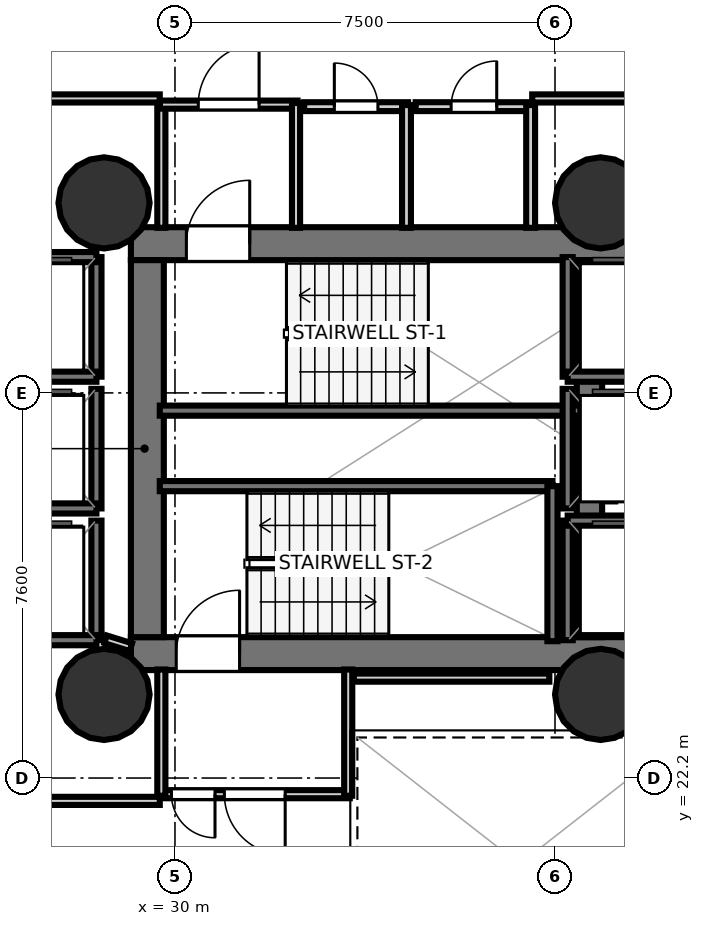
"""IFC4 building model, lengths in metres.
Left out: names, types, materials, properties, quantities, classifications, styles, units other than length and angle.
Written with IfcOpenShell. Run it as: python <this file> out.ifc"""

import sys

from ifc_helpers import new_model, si_unit, direction, frame, frame_2d, origin, origin_2d, place, context, subcontext, project, spatial, rectangle, hollow_circle, extrude, element, fill, save


model = new_model("IFC4")
c1 = context("Model", 3, precision=1e-05, world=origin(), true_north=direction((0.0, 1.0)))
c2 = subcontext(c1, "Body", "Model", "MODEL_VIEW")
j1 = project(units=[si_unit("LENGTHUNIT", "METRE"), si_unit("PLANEANGLEUNIT", "RADIAN")], contexts=[c1])
p1 = place(None, origin())
s1 = spatial("IfcSite", under=j1, at=p1, CompositionType="ELEMENT")
p2 = place(p1, origin())
s2 = spatial("IfcBuilding", under=s1, at=p2, CompositionType="ELEMENT")
p3 = place(p2, frame((0.0, 0.0, 29.4)))
s3 = spatial("IfcBuildingStorey", under=s2, at=p3, CompositionType="ELEMENT", Elevation=29.4)
p4 = place(p3, frame((29.13, 32.745, 0.0), z_axis=(0.0, 0.0, 1.0), x_axis=(1.0, 0.0, 0.0)))
e1 = element("IfcWall", 1, at=p4, inside=s3, PredefinedType="SHEAR", context=c2, shape_type="SweptSolid", body=[
    extrude(rectangle(XDim=10.72, YDim=0.65, at=frame_2d((5.36, 0.0))), origin(), (0.0, 0.0, 1.0), 3.52),
])
p5 = place(p4, frame((1.095, 0.0, 0.0)))
e2 = element("IfcOpeningElement", 2, at=p5, cuts=e1, PredefinedType="OPENING", context=c2, shape_type="SweptSolid", body=[
    extrude(rectangle(XDim=1.25, YDim=2.15, at=frame_2d((0.625, 1.075))), frame((0.0, 0.335, 0.0), z_axis=(0.0, -1.0, 0.0), x_axis=(1.0, 0.0, 0.0)), (0.0, 0.0, 1.0), 0.67),
])
p6 = place(p3, frame((29.13, 24.655, 0.0), z_axis=(0.0, 0.0, 1.0), x_axis=(1.0, 0.0, 0.0)))
e3 = element("IfcWall", 3, at=p6, inside=s3, PredefinedType="SHEAR", context=c2, shape_type="SweptSolid", body=[
    extrude(rectangle(XDim=10.72, YDim=0.65, at=frame_2d((5.36, 0.0))), origin(), (0.0, 0.0, 1.0), 3.52),
])
p7 = place(p6, frame((0.895, 0.0, 0.0)))
e4 = element("IfcOpeningElement", 4, at=p7, cuts=e3, PredefinedType="OPENING", context=c2, shape_type="SweptSolid", body=[
    extrude(rectangle(XDim=1.25, YDim=2.15, at=frame_2d((0.625, 1.075))), frame((0.0, 0.335, 0.0), z_axis=(0.0, -1.0, 0.0), x_axis=(1.0, 0.0, 0.0)), (0.0, 0.0, 1.0), 0.67),
])
p8 = place(p3, frame((29.455, 24.98, 0.0), z_axis=(0.0, 0.0, 1.0), x_axis=(0.0, 1.0, 0.0)))
e5 = element("IfcWall", 5, at=p8, inside=s3, PredefinedType="SHEAR", context=c2, shape_type="SweptSolid", body=[
    extrude(rectangle(XDim=7.44, YDim=0.65, at=frame_2d((3.72, 0.0))), origin(), (0.0, 0.0, 1.0), 3.52),
])
p9 = place(p3, frame((38.18, 24.98, 0.0), z_axis=(0.0, 0.0, 1.0), x_axis=(0.0, 1.0, 0.0)))
e6 = element("IfcWall", 6, at=p9, inside=s3, PredefinedType="SHEAR", context=c2, shape_type="SweptSolid", body=[
    extrude(rectangle(XDim=7.44, YDim=0.5, at=frame_2d((3.72, 0.0))), origin(), (0.0, 0.0, 1.0), 3.52),
])
for number, where, z_axis, x_axis in (
    (7, (28.6, 33.55, 0.0), (0.0, 0.0, 1.0), (1.0, 0.0, 0.0)),
    (8, (28.6, 23.85, 0.0), (0.0, 0.0, 1.0), (1.0, 0.0, 0.0)),
    (9, (38.4, 33.55, 0.0), (0.0, 0.0, 1.0), (1.0, 0.0, 0.0)),
    (10, (38.4, 23.85, 0.0), (0.0, 0.0, 1.0), (1.0, 0.0, 0.0)),
):
    element("IfcColumn", number, at=place(p3, frame(where, z_axis=z_axis, x_axis=x_axis)), inside=s3, PredefinedType="COLUMN", context=c2, shape_type="SweptSolid", body=[
        extrude(hollow_circle(Radius=0.9, WallThickness=0.045, at=origin_2d()), origin(), (0.0, 0.0, 1.0), 3.7),
    ])
p10 = place(p3, frame((29.7, 29.45, 0.0), z_axis=(0.0, 0.0, 1.0), x_axis=(1.0, 0.0, 0.0)))
e11 = element("IfcWall", 11, at=p10, inside=s3, PredefinedType="SOLIDWALL", context=c2, shape_type="SweptSolid", body=[
    extrude(rectangle(XDim=8.3, YDim=0.2, at=frame_2d((4.15, 0.0))), origin(), (0.0, 0.0, 1.0), 3.52),
])
p11 = place(p3, frame((29.7, 27.96, 0.0), z_axis=(0.0, 0.0, 1.0), x_axis=(1.0, 0.0, 0.0)))
e12 = element("IfcWall", 12, at=p11, inside=s3, PredefinedType="SOLIDWALL", context=c2, shape_type="SweptSolid", body=[
    extrude(rectangle(XDim=7.75, YDim=0.2, at=frame_2d((3.875, 0.0))), origin(), (0.0, 0.0, 1.0), 3.52),
])
p12 = place(p3, frame((37.45, 24.9, 0.0), z_axis=(0.0, 0.0, 1.0), x_axis=(0.0, 1.0, 0.0)))
e13 = element("IfcWall", 13, at=p12, inside=s3, PredefinedType="SOLIDWALL", context=c2, shape_type="SweptSolid", body=[
    extrude(rectangle(XDim=3.06, YDim=0.2, at=frame_2d((1.53, 0.0))), origin(), (0.0, 0.0, 1.0), 3.52),
])
p13 = place(p3, frame((37.75, 30.12, 0.0), z_axis=(0.0, 0.0, 1.0), x_axis=(0.0, 1.0, 0.0)))
e14 = element("IfcWall", 14, at=p13, inside=s3, PredefinedType="SOLIDWALL", context=c2, shape_type="SweptSolid", body=[
    extrude(rectangle(XDim=2.36, YDim=0.2, at=frame_2d((1.18, 0.0))), origin(), (0.0, 0.0, 1.0), 3.52),
])
p14 = place(p3, frame((37.75, 30.12, 0.0), z_axis=(0.0, 0.0, 1.0), x_axis=(1.0, 0.0, 0.0)))
e15 = element("IfcWall", 15, at=p14, inside=s3, PredefinedType="SOLIDWALL", context=c2, shape_type="SweptSolid", body=[
    extrude(rectangle(XDim=2.1, YDim=0.2, at=frame_2d((1.05, 0.0))), origin(), (0.0, 0.0, 1.0), 3.52),
])
p15 = place(p3, frame((37.75, 24.92, 0.0), z_axis=(0.0, 0.0, 1.0), x_axis=(0.0, 1.0, 0.0)))
e16 = element("IfcWall", 16, at=p15, inside=s3, PredefinedType="SOLIDWALL", context=c2, shape_type="SweptSolid", body=[
    extrude(rectangle(XDim=2.36, YDim=0.2, at=frame_2d((1.18, 0.0))), origin(), (0.0, 0.0, 1.0), 3.52),
])
p16 = place(p3, frame((37.75, 27.28, 0.0), z_axis=(0.0, 0.0, 1.0), x_axis=(1.0, 0.0, 0.0)))
e17 = element("IfcWall", 17, at=p16, inside=s3, PredefinedType="SOLIDWALL", context=c2, shape_type="SweptSolid", body=[
    extrude(rectangle(XDim=2.1, YDim=0.2, at=frame_2d((1.05, 0.0))), origin(), (0.0, 0.0, 1.0), 3.52),
])
p17 = place(p3, frame((28.45, 30.12, 0.0), z_axis=(0.0, 0.0, 1.0), x_axis=(0.0, 1.0, 0.0)))
e18 = element("IfcWall", 18, at=p17, inside=s3, PredefinedType="SOLIDWALL", context=c2, shape_type="SweptSolid", body=[
    extrude(rectangle(XDim=2.36, YDim=0.2, at=frame_2d((1.18, 0.0))), origin(), (0.0, 0.0, 1.0), 3.52),
])
for number, where, z_axis, x_axis in (
    (19, (26.35, 32.48, 0.0), (0.0, 0.0, 1.0), (1.0, 0.0, 0.0)),
    (20, (26.35, 30.12, 0.0), (0.0, 0.0, 1.0), (1.0, 0.0, 0.0)),
):
    element("IfcWall", number, at=place(p3, frame(where, z_axis=z_axis, x_axis=x_axis)), inside=s3, PredefinedType="SOLIDWALL", context=c2, shape_type="SweptSolid", body=[
        extrude(rectangle(XDim=2.1, YDim=0.2, at=frame_2d((1.05, 0.0))), origin(), (0.0, 0.0, 1.0), 3.52),
    ])
p18 = place(p3, frame((28.45, 27.52, 0.0), z_axis=(0.0, 0.0, 1.0), x_axis=(0.0, 1.0, 0.0)))
e21 = element("IfcWall", 21, at=p18, inside=s3, PredefinedType="SOLIDWALL", context=c2, shape_type="SweptSolid", body=[
    extrude(rectangle(XDim=2.36, YDim=0.2, at=frame_2d((1.18, 0.0))), origin(), (0.0, 0.0, 1.0), 3.52),
])
p19 = place(p3, frame((26.35, 27.52, 0.0), z_axis=(0.0, 0.0, 1.0), x_axis=(1.0, 0.0, 0.0)))
e22 = element("IfcWall", 22, at=p19, inside=s3, PredefinedType="SOLIDWALL", context=c2, shape_type="SweptSolid", body=[
    extrude(rectangle(XDim=2.1, YDim=0.2, at=frame_2d((1.05, 0.0))), origin(), (0.0, 0.0, 1.0), 3.52),
])
p20 = place(p3, frame((28.45, 24.92, 0.0), z_axis=(0.0, 0.0, 1.0), x_axis=(0.0, 1.0, 0.0)))
e23 = element("IfcWall", 23, at=p20, inside=s3, PredefinedType="SOLIDWALL", context=c2, shape_type="SweptSolid", body=[
    extrude(rectangle(XDim=2.36, YDim=0.2, at=frame_2d((1.18, 0.0))), origin(), (0.0, 0.0, 1.0), 3.52),
])
p21 = place(p3, frame((26.35, 24.92, 0.0), z_axis=(0.0, 0.0, 1.0), x_axis=(1.0, 0.0, 0.0)))
e24 = element("IfcWall", 24, at=p21, inside=s3, PredefinedType="SOLIDWALL", context=c2, shape_type="SweptSolid", body=[
    extrude(rectangle(XDim=2.1, YDim=0.2, at=frame_2d((1.05, 0.0))), origin(), (0.0, 0.0, 1.0), 3.52),
])
p22 = place(p3, frame((37.75, 27.52, 0.0), z_axis=(0.0, 0.0, 1.0), x_axis=(0.0, 1.0, 0.0)))
e25 = element("IfcWall", 25, at=p22, inside=s3, PredefinedType="SOLIDWALL", context=c2, shape_type="SweptSolid", body=[
    extrude(rectangle(XDim=2.36, YDim=0.2, at=frame_2d((1.18, 0.0))), origin(), (0.0, 0.0, 1.0), 3.52),
])
p23 = place(p3, frame((29.731, 33.058, 0.0), z_axis=(0.0, 0.0, 1.0), x_axis=(0.0, 1.0, 0.0)))
e26 = element("IfcWall", 26, at=p23, inside=s3, PredefinedType="PARTITIONING", context=c2, shape_type="SweptSolid", body=[
    extrude(rectangle(XDim=2.462, YDim=0.16, at=frame_2d((1.231, 0.0))), origin(), (0.0, 0.0, 1.0), 2.84),
])
p24 = place(p3, frame((29.7, 35.489, 0.0), z_axis=(0.0, 0.0, 1.0), x_axis=(1.0, 0.0, 0.0)))
e27 = element("IfcWall", 27, at=p24, inside=s3, PredefinedType="PARTITIONING", context=c2, shape_type="SweptSolid", body=[
    extrude(rectangle(XDim=2.72, YDim=0.16, at=frame_2d((1.36, 0.0))), origin(), (0.0, 0.0, 1.0), 2.84),
])
p25 = place(p24, frame((0.76, 0.0, 0.0)))
e28 = element("IfcOpeningElement", 28, at=p25, cuts=e27, PredefinedType="OPENING", context=c2, shape_type="SweptSolid", body=[
    extrude(rectangle(XDim=1.2, YDim=2.15, at=frame_2d((0.6, 1.075))), frame((0.0, 0.09, 0.0), z_axis=(0.0, -1.0, 0.0), x_axis=(1.0, 0.0, 0.0)), (0.0, 0.0, 1.0), 0.18),
])
p26 = place(p3, frame((32.389, 35.52, 0.0), z_axis=(0.0, 0.0, 1.0), x_axis=(0.0, -1.0, 0.0)))
e29 = element("IfcWall", 29, at=p26, inside=s3, PredefinedType="PARTITIONING", context=c2, shape_type="SweptSolid", body=[
    extrude(rectangle(XDim=2.462, YDim=0.16, at=frame_2d((1.231, 0.0))), origin(), (0.0, 0.0, 1.0), 2.84),
])
p27 = place(p3, frame((33.45, 21.881, 0.0), z_axis=(0.0, 0.0, 1.0), x_axis=(-1.0, 0.0, 0.0)))
e30 = element("IfcWall", 30, at=p27, inside=s3, PredefinedType="PARTITIONING", context=c2, shape_type="SweptSolid", body=[
    extrude(rectangle(XDim=3.75, YDim=0.16, at=frame_2d((1.875, 0.0))), origin(), (0.0, 0.0, 1.0), 2.84),
])
p28 = place(p27, frame((1.275, 0.0, 0.0)))
e31 = element("IfcOpeningElement", 31, at=p28, cuts=e30, PredefinedType="OPENING", context=c2, shape_type="SweptSolid", body=[
    extrude(rectangle(XDim=1.2, YDim=2.15, at=frame_2d((0.6, 1.075))), frame((0.0, 0.09, 0.0), z_axis=(0.0, -1.0, 0.0), x_axis=(1.0, 0.0, 0.0)), (0.0, 0.0, 1.0), 0.18),
])
p29 = place(p27, frame((2.66, 0.0, 0.0)))
e32 = element("IfcOpeningElement", 32, at=p29, cuts=e30, PredefinedType="OPENING", context=c2, shape_type="SweptSolid", body=[
    extrude(rectangle(XDim=0.86, YDim=2.05, at=frame_2d((0.43, 1.025))), frame((0.0, 0.09, 0.0), z_axis=(0.0, -1.0, 0.0), x_axis=(1.0, 0.0, 0.0)), (0.0, 0.0, 1.0), 0.18),
])
for number, where, z_axis, x_axis in (
    (33, (29.731, 21.85, 0.0), (0.0, 0.0, 1.0), (0.0, 1.0, 0.0)),
    (34, (33.419, 24.342, 0.0), (0.0, 0.0, 1.0), (0.0, -1.0, 0.0)),
):
    element("IfcWall", number, at=place(p3, frame(where, z_axis=z_axis, x_axis=x_axis)), inside=s3, PredefinedType="PARTITIONING", context=c2, shape_type="SweptSolid", body=[
        extrude(rectangle(XDim=2.492, YDim=0.16, at=frame_2d((1.246, 0.0))), origin(), (0.0, 0.0, 1.0), 2.84),
    ])
p30 = place(p3, frame((32.55, 35.449, 0.0), z_axis=(0.0, 0.0, 1.0), x_axis=(1.0, 0.0, 0.0)))
e35 = element("IfcWall", 35, at=p30, inside=s3, PredefinedType="PLUMBINGWALL", context=c2, shape_type="SweptSolid", body=[
    extrude(rectangle(XDim=2.05, YDim=0.175, at=frame_2d((1.025, 0.0))), origin(), (0.0, 0.0, 1.0), 2.84),
])
p31 = place(p30, frame((0.595, 0.0, 0.0)))
e36 = element("IfcOpeningElement", 36, at=p31, cuts=e35, PredefinedType="OPENING", context=c2, shape_type="SweptSolid", body=[
    extrude(rectangle(XDim=0.86, YDim=2.05, at=frame_2d((0.43, 1.025))), frame((0.0, 0.097, 0.0), z_axis=(0.0, -1.0, 0.0), x_axis=(1.0, 0.0, 0.0)), (0.0, 0.0, 1.0), 0.195),
])
p32 = place(p3, frame((34.569, 35.48, 0.0), z_axis=(0.0, 0.0, 1.0), x_axis=(0.0, -1.0, 0.0)))
e37 = element("IfcWall", 37, at=p32, inside=s3, PredefinedType="PLUMBINGWALL", context=c2, shape_type="SweptSolid", body=[
    extrude(rectangle(XDim=2.422, YDim=0.175, at=frame_2d((1.211, 0.0))), origin(), (0.0, 0.0, 1.0), 2.84),
])
p33 = place(p3, frame((34.75, 35.449, 0.0), z_axis=(0.0, 0.0, 1.0), x_axis=(1.0, 0.0, 0.0)))
e38 = element("IfcWall", 38, at=p33, inside=s3, PredefinedType="PLUMBINGWALL", context=c2, shape_type="SweptSolid", body=[
    extrude(rectangle(XDim=2.3, YDim=0.175, at=frame_2d((1.15, 0.0))), origin(), (0.0, 0.0, 1.0), 2.84),
])
p34 = place(p33, frame((0.7, 0.0, 0.0)))
e39 = element("IfcOpeningElement", 39, at=p34, cuts=e38, PredefinedType="OPENING", context=c2, shape_type="SweptSolid", body=[
    extrude(rectangle(XDim=0.9, YDim=2.1, at=frame_2d((0.45, 1.05))), frame((0.0, 0.097, 0.0), z_axis=(0.0, -1.0, 0.0), x_axis=(1.0, 0.0, 0.0)), (0.0, 0.0, 1.0), 0.195),
])
p35 = place(p3, frame((37.019, 35.48, 0.0), z_axis=(0.0, 0.0, 1.0), x_axis=(0.0, -1.0, 0.0)))
e40 = element("IfcWall", 40, at=p35, inside=s3, PredefinedType="PLUMBINGWALL", context=c2, shape_type="SweptSolid", body=[
    extrude(rectangle(XDim=2.422, YDim=0.175, at=frame_2d((1.211, 0.0))), origin(), (0.0, 0.0, 1.0), 2.84),
])
p36 = place(p3, frame((29.13, 24.782, 0.0), z_axis=(0.0, 0.0, 1.0), x_axis=(-0.955000482512, 0.296604245422, 0.0)))
e41 = element("IfcWall", 41, at=p36, inside=s3, PredefinedType="PARTITIONING", context=c2, shape_type="SweptSolid", body=[
    extrude(rectangle(XDim=0.524, YDim=0.16, at=frame_2d((0.262, 0.0))), origin(), (0.0, 0.0, 1.0), 2.84),
])
p37 = place(p3, frame((37.389, 24.181, 0.0), z_axis=(0.0, 0.0, 1.0), x_axis=(-1.0, 0.0, 0.0)))
e42 = element("IfcWall", 42, at=p37, inside=s3, PredefinedType="PARTITIONING", context=c2, shape_type="SweptSolid", body=[
    extrude(rectangle(XDim=3.859, YDim=0.16, at=frame_2d((1.929, 0.0))), origin(), (0.0, 0.0, 1.0), 2.84),
])
p38 = place(p3, frame((39.818, 35.611, 0.0), z_axis=(0.0, 0.0, 1.0), x_axis=(-1.0, 0.0, 0.0)))
e43 = element("IfcWall", 43, at=p38, inside=s3, PredefinedType="PARTITIONING", context=c2, shape_type="SweptSolid", body=[
    extrude(rectangle(XDim=2.768, YDim=0.16, at=frame_2d((1.384, 0.0))), origin(), (0.0, 0.0, 1.0), 2.84),
])
p39 = place(p3, frame((29.7, 35.611, 0.0), z_axis=(0.0, 0.0, 1.0), x_axis=(-1.0, 0.0, 0.0)))
e44 = element("IfcWall", 44, at=p39, inside=s3, PredefinedType="PARTITIONING", context=c2, shape_type="SweptSolid", body=[
    extrude(rectangle(XDim=3.28, YDim=0.16, at=frame_2d((1.64, 0.0))), origin(), (0.0, 0.0, 1.0), 2.798),
])
p40 = place(p3, frame((26.42, 21.749, 0.0), z_axis=(0.0, 0.0, 1.0), x_axis=(1.0, 0.0, 0.0)))
e45 = element("IfcWall", 45, at=p40, inside=s3, PredefinedType="PARTITIONING", context=c2, shape_type="SweptSolid", body=[
    extrude(rectangle(XDim=3.28, YDim=0.16, at=frame_2d((1.64, 0.0))), origin(), (0.0, 0.0, 1.0), 2.84),
])
p41 = place(p5, origin())
e46 = element("IfcDoor", 46, at=p41, inside=s3, OperationType="SINGLE_SWING_RIGHT", PredefinedType="DOOR", context=c2, shape_type="SweptSolid", body=[
    extrude(rectangle(XDim=1.25, YDim=2.15, at=frame_2d((0.625, 1.075))), frame((0.0, 0.025, 0.0), z_axis=(0.0, -1.0, 0.0), x_axis=(1.0, 0.0, 0.0)), (0.0, 0.0, 1.0), 0.05),
])
fill(e2, e46)
p42 = place(p7, origin())
e47 = element("IfcDoor", 47, at=p42, inside=s3, OperationType="SINGLE_SWING_RIGHT", PredefinedType="DOOR", context=c2, shape_type="SweptSolid", body=[
    extrude(rectangle(XDim=1.25, YDim=2.15, at=frame_2d((0.625, 1.075))), frame((0.0, 0.025, 0.0), z_axis=(0.0, -1.0, 0.0), x_axis=(1.0, 0.0, 0.0)), (0.0, 0.0, 1.0), 0.05),
])
fill(e4, e47)
p43 = place(p25, origin())
e48 = element("IfcDoor", 48, at=p43, inside=s3, OperationType="SINGLE_SWING_RIGHT", PredefinedType="DOOR", context=c2, shape_type="SweptSolid", body=[
    extrude(rectangle(XDim=1.2, YDim=2.15, at=frame_2d((0.6, 1.075))), frame((0.0, 0.025, 0.0), z_axis=(0.0, -1.0, 0.0), x_axis=(1.0, 0.0, 0.0)), (0.0, 0.0, 1.0), 0.05),
])
fill(e28, e48)
p44 = place(p28, origin())
e49 = element("IfcDoor", 49, at=p44, inside=s3, OperationType="SINGLE_SWING_LEFT", PredefinedType="DOOR", context=c2, shape_type="SweptSolid", body=[
    extrude(rectangle(XDim=1.2, YDim=2.15, at=frame_2d((0.6, 1.075))), frame((0.0, 0.025, 0.0), z_axis=(0.0, -1.0, 0.0), x_axis=(1.0, 0.0, 0.0)), (0.0, 0.0, 1.0), 0.05),
])
fill(e31, e49)
p45 = place(p31, origin())
e50 = element("IfcDoor", 50, at=p45, inside=s3, OperationType="SINGLE_SWING_LEFT", PredefinedType="DOOR", context=c2, shape_type="SweptSolid", body=[
    extrude(rectangle(XDim=0.86, YDim=2.05, at=frame_2d((0.43, 1.025))), frame((0.0, 0.025, 0.0), z_axis=(0.0, -1.0, 0.0), x_axis=(1.0, 0.0, 0.0)), (0.0, 0.0, 1.0), 0.05),
])
fill(e36, e50)
p46 = place(p34, origin())
e51 = element("IfcDoor", 51, at=p46, inside=s3, OperationType="SINGLE_SWING_RIGHT", PredefinedType="DOOR", context=c2, shape_type="SweptSolid", body=[
    extrude(rectangle(XDim=0.9, YDim=2.1, at=frame_2d((0.45, 1.05))), frame((0.0, 0.025, 0.0), z_axis=(0.0, -1.0, 0.0), x_axis=(1.0, 0.0, 0.0)), (0.0, 0.0, 1.0), 0.05),
])
fill(e39, e51)
p47 = place(p29, origin())
e52 = element("IfcDoor", 52, at=p47, inside=s3, OperationType="SINGLE_SWING_LEFT", PredefinedType="DOOR", context=c2, shape_type="SweptSolid", body=[
    extrude(rectangle(XDim=0.86, YDim=2.05, at=frame_2d((0.43, 1.025))), frame((0.0, 0.025, 0.0), z_axis=(0.0, -1.0, 0.0), x_axis=(1.0, 0.0, 0.0)), (0.0, 0.0, 1.0), 0.05),
])
fill(e32, e52)
save(model, sys.argv[1])
